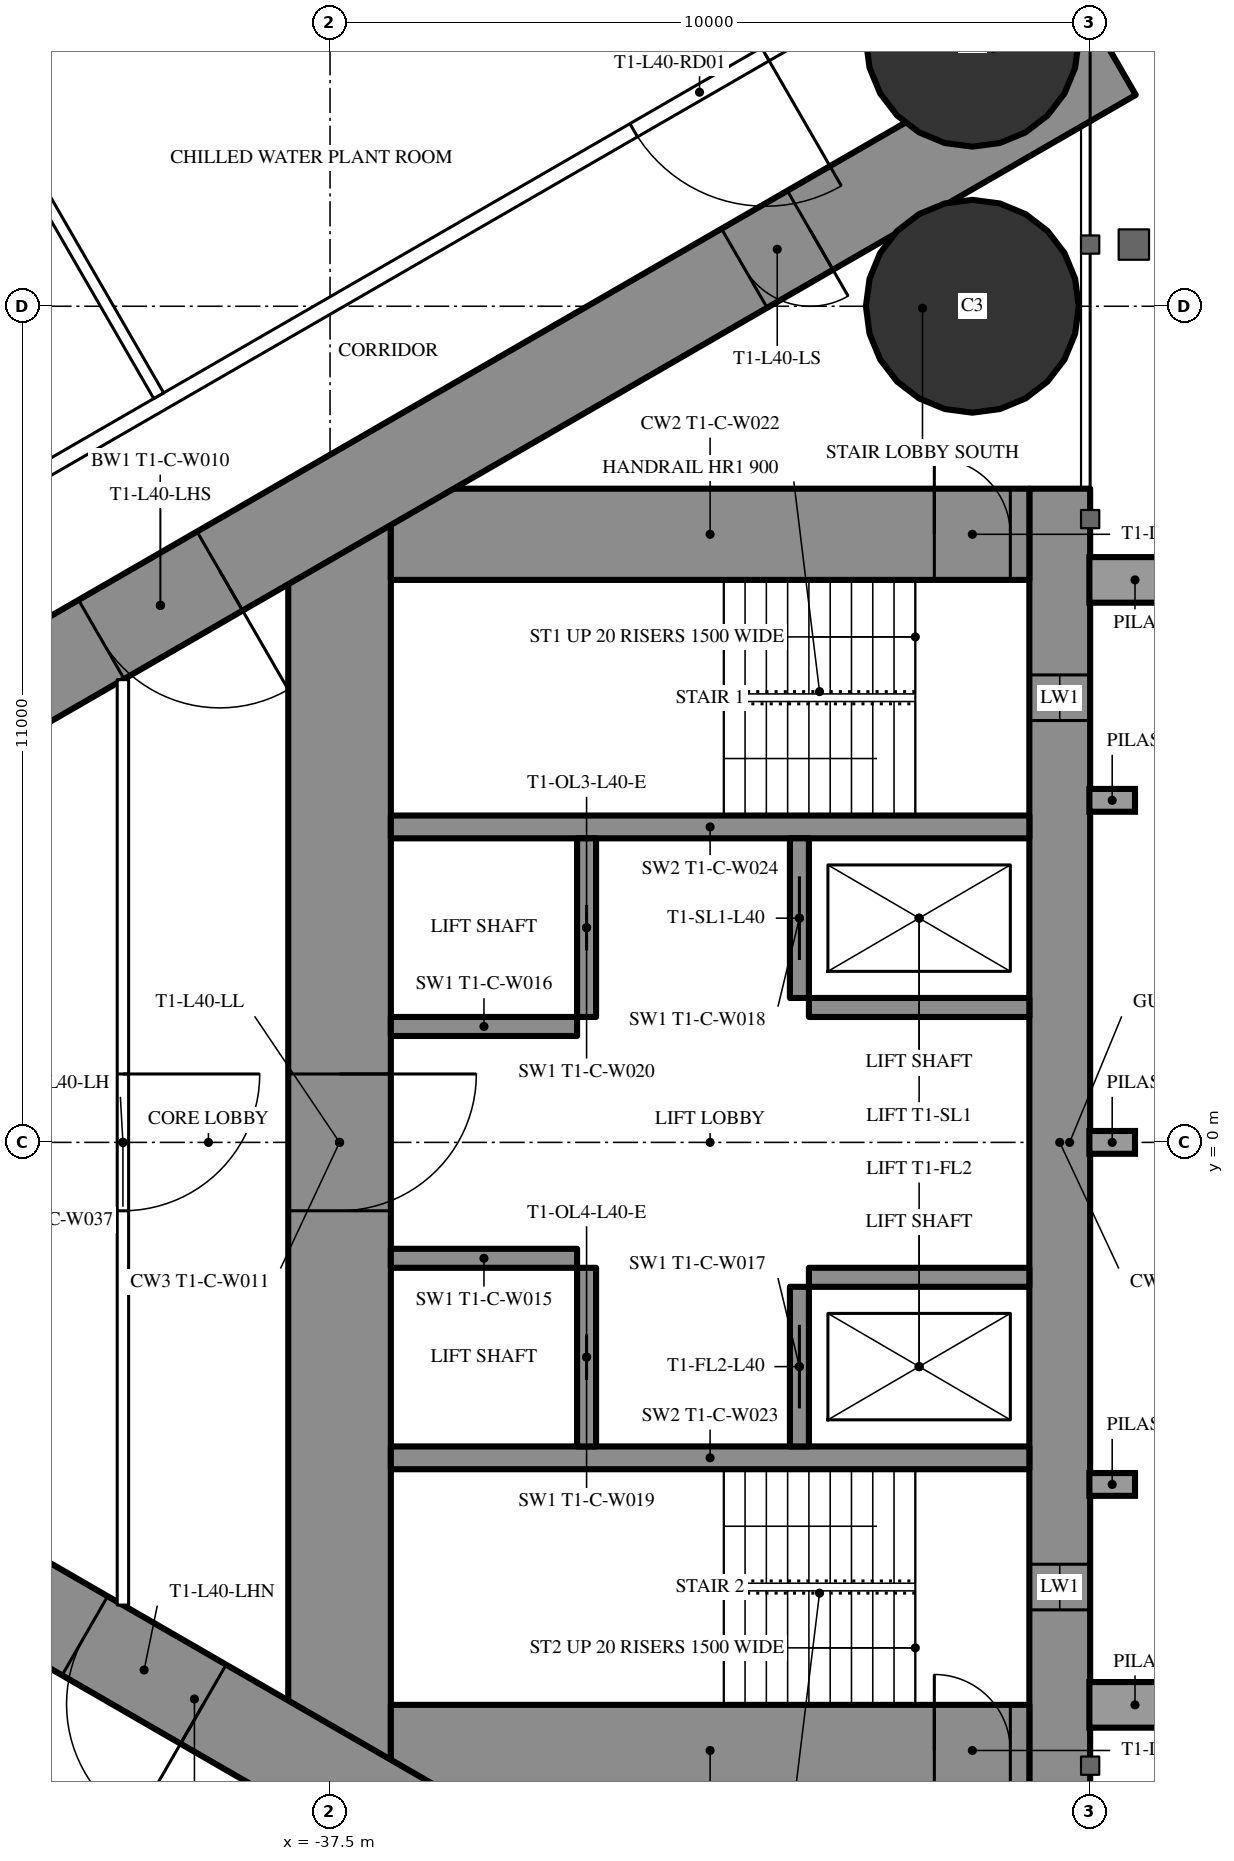
"""IFC4 building model, lengths in metres.
Left out: names, types, materials, properties, quantities, classifications, styles, units other than length and angle.
Written with IfcOpenShell. Run it as: python <this file> out.ifc"""

import sys

from ifc_helpers import new_model, si_unit, direction, frame, frame_2d, origin, origin_2d, place, context, subcontext, project, spatial, rectangle, circle, extrude, element, fill, save


model = new_model("IFC4")
c1 = context("Model", 3, precision=1e-05, world=origin(), true_north=direction((0.0, 1.0)))
c2 = subcontext(c1, "Body", "Model", "MODEL_VIEW")
j1 = project(units=[si_unit("LENGTHUNIT", "METRE"), si_unit("PLANEANGLEUNIT", "RADIAN")], contexts=[c1])
p1 = place(None, origin())
s1 = spatial("IfcSite", under=j1, at=p1, CompositionType="ELEMENT")
p2 = place(p1, origin())
s2 = spatial("IfcBuilding", under=s1, at=p2, CompositionType="ELEMENT")
p3 = place(p2, frame((0.0, 0.0, 152.7)))
s3 = spatial("IfcBuildingStorey", under=s2, at=p3, CompositionType="ELEMENT", Elevation=152.7)
for number, where, z_axis, x_axis in (
    (1, (-29.05, 11.0, 0.0), (0.0, 0.0, 1.0), (1.0, 0.0, 0.0)),
    (2, (-29.05, 14.5, 0.0), (0.0, 0.0, 1.0), (1.0, 0.0, 0.0)),
):
    element("IfcColumn", number, at=place(p3, frame(where, z_axis=z_axis, x_axis=x_axis)), inside=s3, PredefinedType="COLUMN", context=c2, shape_type="SweptSolid", body=[
        extrude(circle(Radius=1.4, at=origin_2d()), origin(), (0.0, 0.0, 1.0), 3.6),
    ])
p4 = place(p3, frame((-27.9, 8.6, 0.0), z_axis=(0.0, 0.0, 1.0), x_axis=(0.0, -1.0, 0.0)))
e3 = element("IfcWall", 3, at=p4, inside=s3, PredefinedType="SHEAR", context=c2, shape_type="SweptSolid", body=[
    extrude(rectangle(XDim=17.2, YDim=0.8, at=frame_2d((8.6, 0.0))), origin(), (0.0, 0.0, 1.0), 3.6),
])
p5 = place(p4, frame((2.45, 0.0, 0.6)))
e4 = element("IfcOpeningElement", 4, at=p5, cuts=e3, PredefinedType="OPENING", context=c2, shape_type="SweptSolid", body=[
    extrude(rectangle(XDim=0.6, YDim=2.1, at=frame_2d((0.3, 1.05))), frame((0.0, 0.41, 0.0), z_axis=(0.0, -1.0, 0.0), x_axis=(1.0, 0.0, 0.0)), (0.0, 0.0, 1.0), 0.82),
])
p6 = place(p4, frame((14.15, 0.0, 0.6)))
e5 = element("IfcOpeningElement", 5, at=p6, cuts=e3, PredefinedType="OPENING", context=c2, shape_type="SweptSolid", body=[
    extrude(rectangle(XDim=0.6, YDim=2.1, at=frame_2d((0.3, 1.05))), frame((0.0, 0.41, 0.0), z_axis=(0.0, -1.0, 0.0), x_axis=(1.0, 0.0, 0.0)), (0.0, 0.0, 1.0), 0.82),
])
p7 = place(p3, frame((-37.375, 8.6, 0.0), z_axis=(0.0, 0.0, 1.0), x_axis=(0.0, -1.0, 0.0)))
e6 = element("IfcWall", 6, at=p7, inside=s3, PredefinedType="SHEAR", context=c2, shape_type="SweptSolid", body=[
    extrude(rectangle(XDim=17.2, YDim=1.35, at=frame_2d((8.6, 0.0))), origin(), (0.0, 0.0, 1.0), 3.6),
])
p8 = place(p7, frame((7.7, 0.0, 0.0)))
e7 = element("IfcOpeningElement", 7, at=p8, cuts=e6, PredefinedType="OPENING", context=c2, shape_type="SweptSolid", body=[
    extrude(rectangle(XDim=1.8, YDim=2.2, at=frame_2d((0.9, 1.1))), frame((0.0, 0.685, 0.0), z_axis=(0.0, -1.0, 0.0), x_axis=(1.0, 0.0, 0.0)), (0.0, 0.0, 1.0), 1.37),
])
p9 = place(p3, frame((-28.3, 8.0, 0.0), z_axis=(0.0, 0.0, 1.0), x_axis=(-1.0, 0.0, 0.0)))
e8 = element("IfcWall", 8, at=p9, inside=s3, PredefinedType="SHEAR", context=c2, shape_type="SweptSolid", body=[
    extrude(rectangle(XDim=8.4, YDim=1.2, at=frame_2d((4.2, 0.0))), origin(), (0.0, 0.0, 1.0), 3.6),
])
p10 = place(p9, frame((0.25, 0.0, 0.0)))
e9 = element("IfcOpeningElement", 9, at=p10, cuts=e8, PredefinedType="OPENING", context=c2, shape_type="SweptSolid", body=[
    extrude(rectangle(XDim=1.0, YDim=2.2, at=frame_2d((0.5, 1.1))), frame((0.0, 0.61, 0.0), z_axis=(0.0, -1.0, 0.0), x_axis=(1.0, 0.0, 0.0)), (0.0, 0.0, 1.0), 1.22),
])
p11 = place(p3, frame((-28.3, -8.0, 0.0), z_axis=(0.0, 0.0, 1.0), x_axis=(-1.0, 0.0, 0.0)))
e10 = element("IfcWall", 10, at=p11, inside=s3, PredefinedType="SHEAR", context=c2, shape_type="SweptSolid", body=[
    extrude(rectangle(XDim=8.4, YDim=1.2, at=frame_2d((4.2, 0.0))), origin(), (0.0, 0.0, 1.0), 3.6),
])
p12 = place(p11, frame((0.25, 0.0, 0.0)))
e11 = element("IfcOpeningElement", 11, at=p12, cuts=e10, PredefinedType="OPENING", context=c2, shape_type="SweptSolid", body=[
    extrude(rectangle(XDim=1.0, YDim=2.2, at=frame_2d((0.5, 1.1))), frame((0.0, 0.61, 0.0), z_axis=(0.0, -1.0, 0.0), x_axis=(1.0, 0.0, 0.0)), (0.0, 0.0, 1.0), 1.22),
])
for number, where, z_axis, x_axis in (
    (12, (-28.3, 4.15, 0.0), (0.0, 0.0, 1.0), (-1.0, 0.0, 0.0)),
    (13, (-28.3, -4.15, 0.0), (0.0, 0.0, 1.0), (-1.0, 0.0, 0.0)),
):
    element("IfcWall", number, at=place(p3, frame(where, z_axis=z_axis, x_axis=x_axis)), inside=s3, PredefinedType="SHEAR", context=c2, shape_type="SweptSolid", body=[
        extrude(rectangle(XDim=8.4, YDim=0.3, at=frame_2d((4.2, 0.0))), origin(), (0.0, 0.0, 1.0), 3.6),
    ])
p13 = place(p3, frame((-31.325, 4.0, 0.0), z_axis=(0.0, 0.0, 1.0), x_axis=(0.0, -1.0, 0.0)))
e14 = element("IfcWall", 14, at=p13, inside=s3, PredefinedType="SHEAR", context=c2, shape_type="SweptSolid", body=[
    extrude(rectangle(XDim=2.1, YDim=0.25, at=frame_2d((1.05, 0.0))), origin(), (0.0, 0.0, 1.0), 3.6),
])
p14 = place(p13, frame((0.5, 0.0, 0.0)))
e15 = element("IfcOpeningElement", 15, at=p14, cuts=e14, PredefinedType="OPENING", context=c2, shape_type="SweptSolid", body=[
    extrude(rectangle(XDim=1.1, YDim=2.2, at=frame_2d((0.55, 1.1))), frame((0.0, 0.135, 0.0), z_axis=(0.0, -1.0, 0.0), x_axis=(1.0, 0.0, 0.0)), (0.0, 0.0, 1.0), 0.27),
])
p15 = place(p3, frame((-34.125, 4.0, 0.0), z_axis=(0.0, 0.0, 1.0), x_axis=(0.0, -1.0, 0.0)))
e16 = element("IfcWall", 16, at=p15, inside=s3, PredefinedType="SHEAR", context=c2, shape_type="SweptSolid", body=[
    extrude(rectangle(XDim=2.35, YDim=0.25, at=frame_2d((1.175, 0.0))), origin(), (0.0, 0.0, 1.0), 3.6),
])
p16 = place(p15, frame((0.875, 0.0, 0.0)))
e17 = element("IfcOpeningElement", 17, at=p16, cuts=e16, PredefinedType="OPENING", context=c2, shape_type="SweptSolid", body=[
    extrude(rectangle(XDim=0.6, YDim=2.0, at=frame_2d((0.3, 1.0))), frame((0.0, 0.135, 0.0), z_axis=(0.0, -1.0, 0.0), x_axis=(1.0, 0.0, 0.0)), (0.0, 0.0, 1.0), 0.27),
])
p17 = place(p3, frame((-28.3, 1.775, 0.0), z_axis=(0.0, 0.0, 1.0), x_axis=(-1.0, 0.0, 0.0)))
e18 = element("IfcWall", 18, at=p17, inside=s3, PredefinedType="SHEAR", context=c2, shape_type="SweptSolid", body=[
    extrude(rectangle(XDim=2.9, YDim=0.25, at=frame_2d((1.45, 0.0))), origin(), (0.0, 0.0, 1.0), 3.6),
])
p18 = place(p3, frame((-34.25, 1.525, 0.0), z_axis=(0.0, 0.0, 1.0), x_axis=(-1.0, 0.0, 0.0)))
e19 = element("IfcWall", 19, at=p18, inside=s3, PredefinedType="SHEAR", context=c2, shape_type="SweptSolid", body=[
    extrude(rectangle(XDim=2.45, YDim=0.25, at=frame_2d((1.225, 0.0))), origin(), (0.0, 0.0, 1.0), 3.6),
])
p19 = place(p3, frame((-31.325, -1.9, 0.0), z_axis=(0.0, 0.0, 1.0), x_axis=(0.0, -1.0, 0.0)))
e20 = element("IfcWall", 20, at=p19, inside=s3, PredefinedType="SHEAR", context=c2, shape_type="SweptSolid", body=[
    extrude(rectangle(XDim=2.1, YDim=0.25, at=frame_2d((1.05, 0.0))), origin(), (0.0, 0.0, 1.0), 3.6),
])
p20 = place(p19, frame((0.5, 0.0, 0.0)))
e21 = element("IfcOpeningElement", 21, at=p20, cuts=e20, PredefinedType="OPENING", context=c2, shape_type="SweptSolid", body=[
    extrude(rectangle(XDim=1.1, YDim=2.2, at=frame_2d((0.55, 1.1))), frame((0.0, 0.135, 0.0), z_axis=(0.0, -1.0, 0.0), x_axis=(1.0, 0.0, 0.0)), (0.0, 0.0, 1.0), 0.27),
])
p21 = place(p3, frame((-34.125, -1.65, 0.0), z_axis=(0.0, 0.0, 1.0), x_axis=(0.0, -1.0, 0.0)))
e22 = element("IfcWall", 22, at=p21, inside=s3, PredefinedType="SHEAR", context=c2, shape_type="SweptSolid", body=[
    extrude(rectangle(XDim=2.35, YDim=0.25, at=frame_2d((1.175, 0.0))), origin(), (0.0, 0.0, 1.0), 3.6),
])
p22 = place(p21, frame((0.875, 0.0, 0.0)))
e23 = element("IfcOpeningElement", 23, at=p22, cuts=e22, PredefinedType="OPENING", context=c2, shape_type="SweptSolid", body=[
    extrude(rectangle(XDim=0.6, YDim=2.0, at=frame_2d((0.3, 1.0))), frame((0.0, 0.135, 0.0), z_axis=(0.0, -1.0, 0.0), x_axis=(1.0, 0.0, 0.0)), (0.0, 0.0, 1.0), 0.27),
])
p23 = place(p3, frame((-28.3, -1.775, 0.0), z_axis=(0.0, 0.0, 1.0), x_axis=(-1.0, 0.0, 0.0)))
e24 = element("IfcWall", 24, at=p23, inside=s3, PredefinedType="SHEAR", context=c2, shape_type="SweptSolid", body=[
    extrude(rectangle(XDim=2.9, YDim=0.25, at=frame_2d((1.45, 0.0))), origin(), (0.0, 0.0, 1.0), 3.6),
])
p24 = place(p3, frame((-34.25, -1.525, 0.0), z_axis=(0.0, 0.0, 1.0), x_axis=(-1.0, 0.0, 0.0)))
e25 = element("IfcWall", 25, at=p24, inside=s3, PredefinedType="SHEAR", context=c2, shape_type="SweptSolid", body=[
    extrude(rectangle(XDim=2.45, YDim=0.25, at=frame_2d((1.225, 0.0))), origin(), (0.0, 0.0, 1.0), 3.6),
])
p25 = place(p3, frame((-27.2, 14.3, 0.0), z_axis=(0.0, 0.0, 1.0), x_axis=(-0.866026593062, -0.499997940104, 0.0)))
e26 = element("IfcWall", 26, at=p25, inside=s3, PredefinedType="SHEAR", context=c2, shape_type="SweptSolid", body=[
    extrude(rectangle(XDim=28.946, YDim=1.2, at=frame_2d((14.473, 0.0))), origin(), (0.0, 0.0, 1.0), 3.6),
])
p26 = place(p25, frame((4.6, 0.0, 0.0)))
e27 = element("IfcOpeningElement", 27, at=p26, cuts=e26, PredefinedType="OPENING", context=c2, shape_type="SweptSolid", body=[
    extrude(rectangle(XDim=1.0, YDim=2.2, at=frame_2d((0.5, 1.1))), frame((0.0, 0.61, 0.0), z_axis=(0.0, -1.0, 0.0), x_axis=(1.0, 0.0, 0.0)), (0.0, 0.0, 1.0), 1.22),
])
p27 = place(p25, frame((13.568, 0.0, 0.0)))
e28 = element("IfcOpeningElement", 28, at=p27, cuts=e26, PredefinedType="OPENING", context=c2, shape_type="SweptSolid", body=[
    extrude(rectangle(XDim=1.8, YDim=2.04, at=frame_2d((0.9, 1.02))), frame((0.0, 0.61, 0.0), z_axis=(0.0, -1.0, 0.0), x_axis=(1.0, 0.0, 0.0)), (0.0, 0.0, 1.0), 1.22),
])
p28 = place(p3, frame((-27.2, -14.3, 0.0), z_axis=(0.0, 0.0, 1.0), x_axis=(-0.866024021859, 0.500002393557, 0.0)))
e29 = element("IfcWall", 29, at=p28, inside=s3, PredefinedType="SHEAR", context=c2, shape_type="SweptSolid", body=[
    extrude(rectangle(XDim=27.907, YDim=1.2, at=frame_2d((13.954, 0.0))), origin(), (0.0, 0.0, 1.0), 3.6),
])
p29 = place(p28, frame((4.6, 0.0, 0.0)))
e30 = element("IfcOpeningElement", 30, at=p29, cuts=e29, PredefinedType="OPENING", context=c2, shape_type="SweptSolid", body=[
    extrude(rectangle(XDim=1.0, YDim=2.2, at=frame_2d((0.5, 1.1))), frame((0.0, 0.61, 0.0), z_axis=(0.0, -1.0, 0.0), x_axis=(1.0, 0.0, 0.0)), (0.0, 0.0, 1.0), 1.22),
])
p30 = place(p28, frame((13.818, 0.0, 0.0)))
e31 = element("IfcOpeningElement", 31, at=p30, cuts=e29, PredefinedType="OPENING", context=c2, shape_type="SweptSolid", body=[
    extrude(rectangle(XDim=1.8, YDim=2.2, at=frame_2d((0.9, 1.1))), frame((0.0, 0.61, 0.0), z_axis=(0.0, -1.0, 0.0), x_axis=(1.0, 0.0, 0.0)), (0.0, 0.0, 1.0), 1.22),
])
p31 = place(p3, frame((-27.803, 16.608, 0.0), z_axis=(0.0, 0.0, 1.0), x_axis=(-0.866025851808, -0.499999223999, 0.0)))
e32 = element("IfcWall", 32, at=p31, inside=s3, PredefinedType="PARTITIONING", context=c2, shape_type="SweptSolid", body=[
    extrude(rectangle(XDim=33.215, YDim=0.2, at=frame_2d((16.608, 0.0))), origin(), (0.0, 0.0, 1.0), 3.35),
])
p32 = place(p31, frame((4.584, 0.0, 0.0)))
e33 = element("IfcOpeningElement", 33, at=p32, cuts=e32, PredefinedType="OPENING", context=c2, shape_type="SweptSolid", body=[
    extrude(rectangle(XDim=2.0, YDim=2.4, at=frame_2d((1.0, 1.2))), frame((0.0, 0.11, 0.0), z_axis=(0.0, -1.0, 0.0), x_axis=(1.0, 0.0, 0.0)), (0.0, 0.0, 1.0), 0.22),
])
p33 = place(p31, frame((18.1, 0.0, 0.0)))
e34 = element("IfcOpeningElement", 34, at=p33, cuts=e32, PredefinedType="OPENING", context=c2, shape_type="SweptSolid", body=[
    extrude(rectangle(XDim=2.0, YDim=2.4, at=frame_2d((1.0, 1.2))), frame((0.0, 0.11, 0.0), z_axis=(0.0, -1.0, 0.0), x_axis=(1.0, 0.0, 0.0)), (0.0, 0.0, 1.0), 0.22),
])
p34 = place(p31, frame((26.147, 0.0, 0.0)))
e35 = element("IfcOpeningElement", 35, at=p34, cuts=e32, PredefinedType="OPENING", context=c2, shape_type="SweptSolid", body=[
    extrude(rectangle(XDim=2.0, YDim=2.4, at=frame_2d((1.0, 1.2))), frame((0.0, 0.11, 0.0), z_axis=(0.0, -1.0, 0.0), x_axis=(1.0, 0.0, 0.0)), (0.0, 0.0, 1.0), 0.22),
])
p35 = place(p3, frame((-39.754, 9.823, 0.0), z_axis=(0.0, 0.0, 1.0), x_axis=(-0.499997670926, 0.866026748472, 0.0)))
e36 = element("IfcWall", 36, at=p35, inside=s3, PredefinedType="PARTITIONING", context=c2, shape_type="SweptSolid", body=[
    extrude(rectangle(XDim=6.757, YDim=0.15, at=frame_2d((3.379, 0.0))), origin(), (0.0, 0.0, 1.0), 2.4),
])
p36 = place(p3, frame((-40.225, 6.087, 0.0), z_axis=(0.0, 0.0, 1.0), x_axis=(0.0, -1.0, 0.0)))
e37 = element("IfcWall", 37, at=p36, inside=s3, PredefinedType="PARTITIONING", context=c2, shape_type="SweptSolid", body=[
    extrude(rectangle(XDim=12.174, YDim=0.15, at=frame_2d((6.087, 0.0))), origin(), (0.0, 0.0, 1.0), 3.35),
])
p37 = place(p36, frame((5.187, 0.0, 0.0)))
e38 = element("IfcOpeningElement", 38, at=p37, cuts=e37, PredefinedType="OPENING", context=c2, shape_type="SweptSolid", body=[
    extrude(rectangle(XDim=1.8, YDim=2.2, at=frame_2d((0.9, 1.1))), frame((0.0, 0.085, 0.0), z_axis=(0.0, -1.0, 0.0), x_axis=(1.0, 0.0, 0.0)), (0.0, 0.0, 1.0), 0.17),
])
p38 = place(p3, frame((-39.758, -11.697, 0.0), z_axis=(0.0, 0.0, 1.0), x_axis=(-0.866024194504, 0.500002094529, 0.0)))
e39 = element("IfcWall", 39, at=p38, inside=s3, PredefinedType="PARTITIONING", context=c2, shape_type="SweptSolid", body=[
    extrude(rectangle(XDim=6.6, YDim=0.25, at=frame_2d((3.3, 0.0))), origin(), (0.0, 0.0, 1.0), 3.35),
])
p39 = place(p32, origin())
e40 = element("IfcDoor", 40, at=p39, inside=s3, OperationType="DOUBLE_DOOR_SINGLE_SWING", PredefinedType="DOOR", context=c2, shape_type="SweptSolid", body=[
    extrude(rectangle(XDim=2.0, YDim=2.4, at=frame_2d((1.0, 1.2))), frame((0.0, 0.025, 0.0), z_axis=(0.0, -1.0, 0.0), x_axis=(1.0, 0.0, 0.0)), (0.0, 0.0, 1.0), 0.05),
])
fill(e33, e40)
p40 = place(p37, origin())
e41 = element("IfcDoor", 41, at=p40, inside=s3, OperationType="DOUBLE_DOOR_SINGLE_SWING", PredefinedType="DOOR", context=c2, shape_type="SweptSolid", body=[
    extrude(rectangle(XDim=1.8, YDim=2.2, at=frame_2d((0.9, 1.1))), frame((0.0, 0.025, 0.0), z_axis=(0.0, -1.0, 0.0), x_axis=(1.0, 0.0, 0.0)), (0.0, 0.0, 1.0), 0.05),
])
fill(e38, e41)
p41 = place(p26, origin())
e42 = element("IfcDoor", 42, at=p41, inside=s3, OperationType="SINGLE_SWING_LEFT", PredefinedType="DOOR", context=c2, shape_type="SweptSolid", body=[
    extrude(rectangle(XDim=1.0, YDim=2.2, at=frame_2d((0.5, 1.1))), frame((0.0, 0.025, 0.0), z_axis=(0.0, -1.0, 0.0), x_axis=(1.0, 0.0, 0.0)), (0.0, 0.0, 1.0), 0.05),
])
fill(e27, e42)
p42 = place(p27, origin())
e43 = element("IfcDoor", 43, at=p42, inside=s3, OperationType="DOUBLE_DOOR_SINGLE_SWING", PredefinedType="DOOR", context=c2, shape_type="SweptSolid", body=[
    extrude(rectangle(XDim=1.8, YDim=2.04, at=frame_2d((0.9, 1.02))), frame((0.0, 0.025, 0.0), z_axis=(0.0, -1.0, 0.0), x_axis=(1.0, 0.0, 0.0)), (0.0, 0.0, 1.0), 0.05),
])
fill(e28, e43)
p43 = place(p30, origin())
e44 = element("IfcDoor", 44, at=p43, inside=s3, OperationType="DOUBLE_DOOR_SINGLE_SWING", PredefinedType="DOOR", context=c2, shape_type="SweptSolid", body=[
    extrude(rectangle(XDim=1.8, YDim=2.2, at=frame_2d((0.9, 1.1))), frame((0.0, 0.025, 0.0), z_axis=(0.0, -1.0, 0.0), x_axis=(1.0, 0.0, 0.0)), (0.0, 0.0, 1.0), 0.05),
])
fill(e31, e44)
p44 = place(p8, origin())
e45 = element("IfcDoor", 45, at=p44, inside=s3, OperationType="DOUBLE_DOOR_SINGLE_SWING", PredefinedType="DOOR", context=c2, shape_type="SweptSolid", body=[
    extrude(rectangle(XDim=1.8, YDim=2.2, at=frame_2d((0.9, 1.1))), frame((0.0, 0.025, 0.0), z_axis=(0.0, -1.0, 0.0), x_axis=(1.0, 0.0, 0.0)), (0.0, 0.0, 1.0), 0.05),
])
fill(e7, e45)
p45 = place(p10, origin())
e46 = element("IfcDoor", 46, at=p45, inside=s3, OperationType="SINGLE_SWING_RIGHT", PredefinedType="DOOR", context=c2, shape_type="SweptSolid", body=[
    extrude(rectangle(XDim=1.0, YDim=2.2, at=frame_2d((0.5, 1.1))), frame((0.0, 0.025, 0.0), z_axis=(0.0, -1.0, 0.0), x_axis=(1.0, 0.0, 0.0)), (0.0, 0.0, 1.0), 0.05),
])
fill(e9, e46)
p46 = place(p12, origin())
e47 = element("IfcDoor", 47, at=p46, inside=s3, OperationType="SINGLE_SWING_RIGHT", PredefinedType="DOOR", context=c2, shape_type="SweptSolid", body=[
    extrude(rectangle(XDim=1.0, YDim=2.2, at=frame_2d((0.5, 1.1))), frame((0.0, 0.025, 0.0), z_axis=(0.0, -1.0, 0.0), x_axis=(1.0, 0.0, 0.0)), (0.0, 0.0, 1.0), 0.05),
])
fill(e11, e47)
p47 = place(p14, origin())
e48 = element("IfcDoor", 48, at=p47, inside=s3, OperationType="SLIDING_TO_LEFT", PredefinedType="USERDEFINED", context=c2, shape_type="SweptSolid", body=[
    extrude(rectangle(XDim=1.1, YDim=2.2, at=frame_2d((0.55, 1.1))), frame((0.0, 0.025, 0.0), z_axis=(0.0, -1.0, 0.0), x_axis=(1.0, 0.0, 0.0)), (0.0, 0.0, 1.0), 0.05),
])
fill(e15, e48)
p48 = place(p20, origin())
e49 = element("IfcDoor", 49, at=p48, inside=s3, OperationType="SLIDING_TO_LEFT", PredefinedType="USERDEFINED", context=c2, shape_type="SweptSolid", body=[
    extrude(rectangle(XDim=1.1, YDim=2.2, at=frame_2d((0.55, 1.1))), frame((0.0, 0.025, 0.0), z_axis=(0.0, -1.0, 0.0), x_axis=(1.0, 0.0, 0.0)), (0.0, 0.0, 1.0), 0.05),
])
fill(e21, e49)
p49 = place(p16, origin())
e50 = element("IfcDoor", 50, at=p49, inside=s3, OperationType="SLIDING_TO_LEFT", PredefinedType="DOOR", context=c2, shape_type="SweptSolid", body=[
    extrude(rectangle(XDim=0.6, YDim=2.0, at=frame_2d((0.3, 1.0))), frame((0.0, 0.025, 0.0), z_axis=(0.0, -1.0, 0.0), x_axis=(1.0, 0.0, 0.0)), (0.0, 0.0, 1.0), 0.05),
])
fill(e17, e50)
p50 = place(p22, origin())
e51 = element("IfcDoor", 51, at=p50, inside=s3, OperationType="SLIDING_TO_LEFT", PredefinedType="DOOR", context=c2, shape_type="SweptSolid", body=[
    extrude(rectangle(XDim=0.6, YDim=2.0, at=frame_2d((0.3, 1.0))), frame((0.0, 0.025, 0.0), z_axis=(0.0, -1.0, 0.0), x_axis=(1.0, 0.0, 0.0)), (0.0, 0.0, 1.0), 0.05),
])
fill(e23, e51)
p51 = place(p5, origin())
e52 = element("IfcWindow", 52, at=p51, inside=s3, PartitioningType="SINGLE_PANEL", PredefinedType="WINDOW", context=c2, shape_type="SweptSolid", body=[
    extrude(rectangle(XDim=0.6, YDim=2.1, at=frame_2d((0.3, 1.05))), frame((0.0, 0.03, 0.0), z_axis=(0.0, -1.0, 0.0), x_axis=(1.0, 0.0, 0.0)), (0.0, 0.0, 1.0), 0.06),
])
fill(e4, e52)
p52 = place(p6, origin())
e53 = element("IfcWindow", 53, at=p52, inside=s3, PartitioningType="SINGLE_PANEL", PredefinedType="WINDOW", context=c2, shape_type="SweptSolid", body=[
    extrude(rectangle(XDim=0.6, YDim=2.1, at=frame_2d((0.3, 1.05))), frame((0.0, 0.03, 0.0), z_axis=(0.0, -1.0, 0.0), x_axis=(1.0, 0.0, 0.0)), (0.0, 0.0, 1.0), 0.06),
])
fill(e5, e53)
save(model, sys.argv[1])
